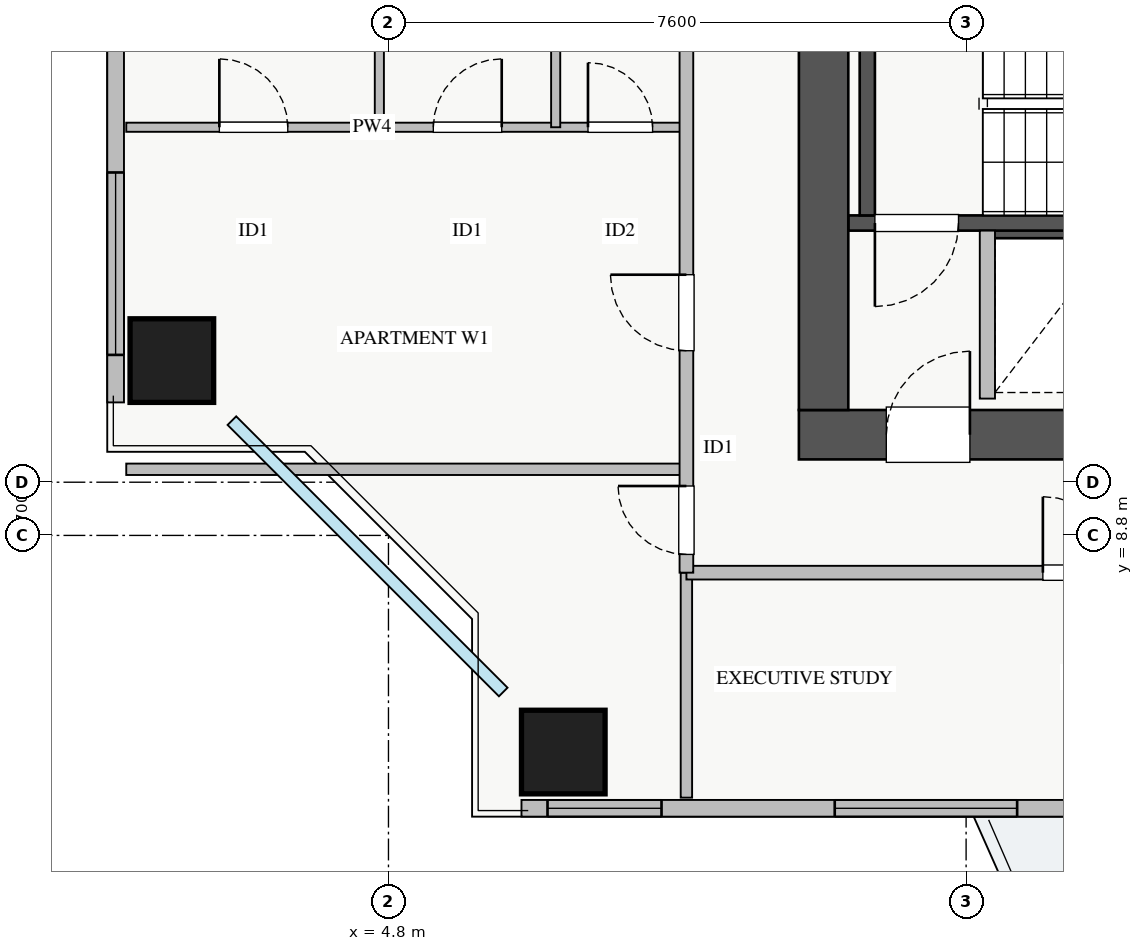
"""IFC4 building model, lengths in metres.
Left out: names, types, materials, properties, quantities, classifications, styles, units other than length and angle.
Written with IfcOpenShell. Run it as: python <this file> out.ifc"""

import sys

from ifc_helpers import new_model, si_unit, direction, frame, frame_2d, origin, origin_2d, place, context, subcontext, project, spatial, rectangle, extrude, source, transform, mapped, element, fill, save


model = new_model("IFC4")
c1 = context("Model", 3, precision=1e-05, world=origin(), true_north=direction((0.0, 1.0)))
c2 = subcontext(c1, "Body", "Model", "MODEL_VIEW")
j1 = project(units=[si_unit("LENGTHUNIT", "METRE"), si_unit("PLANEANGLEUNIT", "RADIAN")], contexts=[c1])
p1 = place(None, origin())
s1 = spatial("IfcSite", under=j1, at=p1, CompositionType="ELEMENT")
p2 = place(p1, origin())
s2 = spatial("IfcBuilding", under=s1, at=p2, CompositionType="ELEMENT")
p3 = place(p2, frame((0.0, 0.0, 126.25)))
s3 = spatial("IfcBuildingStorey", under=s2, at=p3, CompositionType="ELEMENT", Elevation=126.25)
p4 = place(p3, frame((12.68, 12.8, 0.0), z_axis=(0.0, 0.0, 1.0), x_axis=(1.0, 0.0, 0.0)))
e1 = element("IfcWall", 1, at=p4, inside=s3, PredefinedType="SHEAR", context=c2, shape_type="SweptSolid", body=[
    extrude(rectangle(XDim=1.94, YDim=0.18, at=frame_2d((0.97, 0.0))), origin(), (0.0, 0.0, 1.0), 3.07),
])
p5 = place(p3, frame((10.85, 12.91, 0.0), z_axis=(0.0, 0.0, 1.0), x_axis=(1.0, 0.0, 0.0)))
e2 = element("IfcWall", 2, at=p5, inside=s3, PredefinedType="SHEAR", context=c2, shape_type="SweptSolid", body=[
    extrude(rectangle(XDim=7.3, YDim=0.2, at=frame_2d((3.65, 0.0))), origin(), (0.0, 0.0, 1.0), 3.25),
])
p6 = place(p5, frame((0.35, 0.0, 0.0)))
e3 = element("IfcOpeningElement", 3, at=p6, cuts=e2, PredefinedType="OPENING", context=c2, shape_type="SweptSolid", body=[
    extrude(rectangle(XDim=1.1, YDim=2.05, at=frame_2d((0.55, 1.025))), frame((0.0, 0.11, 0.0), z_axis=(0.0, -1.0, 0.0), x_axis=(1.0, 0.0, 0.0)), (0.0, 0.0, 1.0), 0.22),
])
p7 = place(p3, frame((11.1, 13.01, 0.0), z_axis=(0.0, 0.0, 1.0), x_axis=(0.0, 1.0, 0.0)))
e4 = element("IfcWall", 4, at=p7, inside=s3, PredefinedType="SHEAR", context=c2, shape_type="SweptSolid", body=[
    extrude(rectangle(XDim=2.94, YDim=0.2, at=frame_2d((1.47, 0.0))), origin(), (0.0, 0.0, 1.0), 3.25),
])
p8 = place(p3, frame((10.2, 10.125, 0.0), z_axis=(0.0, 0.0, 1.0), x_axis=(1.0, 0.0, 0.0)))
e5 = element("IfcWall", 5, at=p8, inside=s3, PredefinedType="SHEAR", context=c2, shape_type="SweptSolid", body=[
    extrude(rectangle(XDim=17.6, YDim=0.65, at=frame_2d((8.8, 0.0))), origin(), (0.0, 0.0, 1.0), 3.25),
])
p9 = place(p8, frame((1.15, 0.0, 0.0)))
e6 = element("IfcOpeningElement", 6, at=p9, cuts=e5, PredefinedType="OPENING", context=c2, shape_type="SweptSolid", body=[
    extrude(rectangle(XDim=1.1, YDim=2.05, at=frame_2d((0.55, 1.025))), frame((0.0, 0.335, 0.0), z_axis=(0.0, -1.0, 0.0), x_axis=(1.0, 0.0, 0.0)), (0.0, 0.0, 1.0), 0.67),
])
p10 = place(p8, frame((8.3, 0.0, 0.0)))
e7 = element("IfcOpeningElement", 7, at=p10, cuts=e5, PredefinedType="OPENING", context=c2, shape_type="SweptSolid", body=[
    extrude(rectangle(XDim=1.1, YDim=2.05, at=frame_2d((0.55, 1.025))), frame((0.0, 0.335, 0.0), z_axis=(0.0, -1.0, 0.0), x_axis=(1.0, 0.0, 0.0)), (0.0, 0.0, 1.0), 0.67),
])
p11 = place(p8, frame((4.9, 0.0, 0.0)))
e8 = element("IfcOpeningElement", 8, at=p11, cuts=e5, PredefinedType="OPENING", context=c2, shape_type="SweptSolid", body=[
    extrude(rectangle(XDim=1.1, YDim=2.05, at=frame_2d((0.55, 1.025))), frame((0.0, 0.335, 0.0), z_axis=(0.0, -1.0, 0.0), x_axis=(1.0, 0.0, 0.0)), (0.0, 0.0, 1.0), 0.67),
])
p12 = place(p8, frame((14.74, 0.0, 0.0)))
e9 = element("IfcOpeningElement", 9, at=p12, cuts=e5, PredefinedType="OPENING", context=c2, shape_type="SweptSolid", body=[
    extrude(rectangle(XDim=1.0, YDim=2.05, at=frame_2d((0.5, 1.025))), frame((0.0, 0.335, 0.0), z_axis=(0.0, -1.0, 0.0), x_axis=(1.0, 0.0, 0.0)), (0.0, 0.0, 1.0), 0.67),
])
p13 = place(p8, frame((11.67, 0.0, 0.0)))
e10 = element("IfcOpeningElement", 10, at=p13, cuts=e5, PredefinedType="OPENING", context=c2, shape_type="SweptSolid", body=[
    extrude(rectangle(XDim=1.0, YDim=2.05, at=frame_2d((0.5, 1.025))), frame((0.0, 0.335, 0.0), z_axis=(0.0, -1.0, 0.0), x_axis=(1.0, 0.0, 0.0)), (0.0, 0.0, 1.0), 0.67),
])
p14 = place(p3, frame((10.525, 10.45, 0.0), z_axis=(0.0, 0.0, 1.0), x_axis=(0.0, 1.0, 0.0)))
e11 = element("IfcWall", 11, at=p14, inside=s3, PredefinedType="SHEAR", context=c2, shape_type="SweptSolid", body=[
    extrude(rectangle(XDim=5.9, YDim=0.65, at=frame_2d((2.95, 0.0))), origin(), (0.0, 0.0, 1.0), 3.25),
])
m1 = source(origin(), c2, "Body", "SweptSolid", [
    extrude(rectangle(XDim=1.1, YDim=1.1, at=origin_2d()), origin(), (0.0, 0.0, 1.0), 3.25),
])
for number, where, z_axis, x_axis in (
    (12, (7.1, 5.95, 0.0), (0.0, 0.0, 1.0), (1.0, 0.0, 0.0)),
    (13, (1.95, 11.1, 0.0), (0.0, 0.0, 1.0), (1.0, 0.0, 0.0)),
):
    element("IfcColumn", number, at=place(p3, frame(where, z_axis=z_axis, x_axis=x_axis)), inside=s3, PredefinedType="COLUMN", context=c2, shape_type="MappedRepresentation", body=[
        mapped(m1, transform((0.0, 0.0, 0.0), x_axis=(1.0, 0.0, 0.0), y_axis=(0.0, 1.0, 0.0), z_axis=(0.0, 0.0, 1.0), scale=1.0)),
    ])
p15 = place(p3, frame((6.55, 5.21, 0.0), z_axis=(0.0, 0.0, 1.0), x_axis=(1.0, 0.0, 0.0)))
e14 = element("IfcWall", 14, at=p15, inside=s3, PredefinedType="STANDARD", context=c2, shape_type="SweptSolid", body=[
    extrude(rectangle(XDim=24.9, YDim=0.22, at=frame_2d((12.45, 0.0))), origin(), (0.0, 0.0, 1.0), 2.61),
])
p16 = place(p15, frame((13.3, 0.0, 0.0)))
e15 = element("IfcOpeningElement", 15, at=p16, cuts=e14, PredefinedType="OPENING", context=c2, shape_type="SweptSolid", body=[
    extrude(rectangle(XDim=1.2, YDim=2.1, at=frame_2d((0.6, 1.05))), frame((0.0, 0.12, 0.0), z_axis=(0.0, -1.0, 0.0), x_axis=(1.0, 0.0, 0.0)), (0.0, 0.0, 1.0), 0.24),
])
p17 = place(p15, frame((0.343, 0.0, 0.9)))
e16 = element("IfcOpeningElement", 16, at=p17, cuts=e14, PredefinedType="OPENING", context=c2, shape_type="SweptSolid", body=[
    extrude(rectangle(XDim=1.5, YDim=1.5, at=frame_2d((0.75, 0.75))), frame((0.0, 0.12, 0.0), z_axis=(0.0, -1.0, 0.0), x_axis=(1.0, 0.0, 0.0)), (0.0, 0.0, 1.0), 0.24),
])
p18 = place(p15, frame((8.438, 0.0, 0.9)))
e17 = element("IfcOpeningElement", 17, at=p18, cuts=e14, PredefinedType="OPENING", context=c2, shape_type="SweptSolid", body=[
    extrude(rectangle(XDim=1.8, YDim=1.45, at=frame_2d((0.9, 0.725))), frame((0.0, 0.12, 0.0), z_axis=(0.0, -1.0, 0.0), x_axis=(1.0, 0.0, 0.0)), (0.0, 0.0, 1.0), 0.24),
])
p19 = place(p15, frame((14.813, 0.0, 0.9)))
e18 = element("IfcOpeningElement", 18, at=p19, cuts=e14, PredefinedType="OPENING", context=c2, shape_type="SweptSolid", body=[
    extrude(rectangle(XDim=1.5, YDim=1.45, at=frame_2d((0.75, 0.725))), frame((0.0, 0.12, 0.0), z_axis=(0.0, -1.0, 0.0), x_axis=(1.0, 0.0, 0.0)), (0.0, 0.0, 1.0), 0.24),
])
p20 = place(p15, frame((20.738, 0.0, 0.9)))
e19 = element("IfcOpeningElement", 19, at=p20, cuts=e14, PredefinedType="OPENING", context=c2, shape_type="SweptSolid", body=[
    extrude(rectangle(XDim=2.1, YDim=1.48, at=frame_2d((1.05, 0.74))), frame((0.0, 0.12, 0.0), z_axis=(0.0, -1.0, 0.0), x_axis=(1.0, 0.0, 0.0)), (0.0, 0.0, 1.0), 0.24),
])
p21 = place(p15, frame((4.122, 0.0, 0.9)))
e20 = element("IfcOpeningElement", 20, at=p21, cuts=e14, PredefinedType="OPENING", context=c2, shape_type="SweptSolid", body=[
    extrude(rectangle(XDim=2.4, YDim=1.5, at=frame_2d((1.2, 0.75))), frame((0.0, 0.12, 0.0), z_axis=(0.0, -1.0, 0.0), x_axis=(1.0, 0.0, 0.0)), (0.0, 0.0, 1.0), 0.24),
])
p22 = place(p3, frame((1.21, 10.55, 0.0), z_axis=(0.0, 0.0, 1.0), x_axis=(0.0, 1.0, 0.0)))
e21 = element("IfcWall", 21, at=p22, inside=s3, PredefinedType="STANDARD", context=c2, shape_type="SweptSolid", body=[
    extrude(rectangle(XDim=24.9, YDim=0.22, at=frame_2d((12.45, 0.0))), origin(), (0.0, 0.0, 1.0), 2.61),
])
p23 = place(p22, frame((13.3, 0.0, 0.0)))
e22 = element("IfcOpeningElement", 22, at=p23, cuts=e21, PredefinedType="OPENING", context=c2, shape_type="SweptSolid", body=[
    extrude(rectangle(XDim=1.2, YDim=2.1, at=frame_2d((0.6, 1.05))), frame((0.0, 0.12, 0.0), z_axis=(0.0, -1.0, 0.0), x_axis=(1.0, 0.0, 0.0)), (0.0, 0.0, 1.0), 0.24),
])
p24 = place(p22, frame((0.625, 0.0, 0.9)))
e23 = element("IfcOpeningElement", 23, at=p24, cuts=e21, PredefinedType="OPENING", context=c2, shape_type="SweptSolid", body=[
    extrude(rectangle(XDim=2.4, YDim=1.5, at=frame_2d((1.2, 0.75))), frame((0.0, 0.12, 0.0), z_axis=(0.0, -1.0, 0.0), x_axis=(1.0, 0.0, 0.0)), (0.0, 0.0, 1.0), 0.24),
])
p25 = place(p22, frame((21.82, 0.0, 0.9)))
e24 = element("IfcOpeningElement", 24, at=p25, cuts=e21, PredefinedType="OPENING", context=c2, shape_type="SweptSolid", body=[
    extrude(rectangle(XDim=2.1, YDim=1.5, at=frame_2d((1.05, 0.75))), frame((0.0, 0.12, 0.0), z_axis=(0.0, -1.0, 0.0), x_axis=(1.0, 0.0, 0.0)), (0.0, 0.0, 1.0), 0.24),
])
p26 = place(p22, frame((4.847, 0.0, 0.9)))
e25 = element("IfcOpeningElement", 25, at=p26, cuts=e21, PredefinedType="OPENING", context=c2, shape_type="SweptSolid", body=[
    extrude(rectangle(XDim=2.4, YDim=1.5, at=frame_2d((1.2, 0.75))), frame((0.0, 0.12, 0.0), z_axis=(0.0, -1.0, 0.0), x_axis=(1.0, 0.0, 0.0)), (0.0, 0.0, 1.0), 0.24),
])
p27 = place(p22, frame((16.895, 0.0, 0.9)))
e26 = element("IfcOpeningElement", 26, at=p27, cuts=e21, PredefinedType="OPENING", context=c2, shape_type="SweptSolid", body=[
    extrude(rectangle(XDim=0.9, YDim=1.2, at=frame_2d((0.45, 0.6))), frame((0.0, 0.12, 0.0), z_axis=(0.0, -1.0, 0.0), x_axis=(1.0, 0.0, 0.0)), (0.0, 0.0, 1.0), 0.24),
])
p28 = place(p3, frame((12.68, 10.6, 0.0), z_axis=(0.0, 0.0, 1.0), x_axis=(0.0, 1.0, 0.0)))
e27 = element("IfcWall", 27, at=p28, inside=s3, PredefinedType="PARTITIONING", context=c2, shape_type="SweptSolid", body=[
    extrude(rectangle(XDim=2.21, YDim=0.2, at=frame_2d((1.105, 0.0))), origin(), (0.0, 0.0, 1.0), 3.07),
])
p29 = place(p3, frame((8.72, 5.35, 0.0), z_axis=(0.0, 0.0, 1.0), x_axis=(0.0, 1.0, 0.0)))
e28 = element("IfcWall", 28, at=p29, inside=s3, PredefinedType="PARTITIONING", context=c2, shape_type="SweptSolid", body=[
    extrude(rectangle(XDim=2.96, YDim=0.15, at=frame_2d((1.48, 0.0))), origin(), (0.0, 0.0, 1.0), 3.07),
])
p30 = place(p3, frame((8.72, 8.31, 0.0), z_axis=(0.0, 0.0, 1.0), x_axis=(1.0, 0.0, 0.0)))
e29 = element("IfcWall", 29, at=p30, inside=s3, PredefinedType="PARTITIONING", context=c2, shape_type="SweptSolid", body=[
    extrude(rectangle(XDim=23.63, YDim=0.18, at=frame_2d((11.815, 0.0))), origin(), (0.0, 0.0, 1.0), 3.07),
])
p31 = place(p30, frame((4.69, 0.0, 0.0)))
e30 = element("IfcOpeningElement", 30, at=p31, cuts=e29, PredefinedType="OPENING", context=c2, shape_type="SweptSolid", body=[
    extrude(rectangle(XDim=1.0, YDim=2.05, at=frame_2d((0.5, 1.025))), frame((0.0, 0.1, 0.0), z_axis=(0.0, -1.0, 0.0), x_axis=(1.0, 0.0, 0.0)), (0.0, 0.0, 1.0), 0.2),
])
p32 = place(p30, frame((16.32, 0.0, 0.0)))
e31 = element("IfcOpeningElement", 31, at=p32, cuts=e29, PredefinedType="OPENING", context=c2, shape_type="SweptSolid", body=[
    extrude(rectangle(XDim=1.0, YDim=2.05, at=frame_2d((0.5, 1.025))), frame((0.0, 0.1, 0.0), z_axis=(0.0, -1.0, 0.0), x_axis=(1.0, 0.0, 0.0)), (0.0, 0.0, 1.0), 0.2),
])
p33 = place(p3, frame((1.35, 9.67, 0.0), z_axis=(0.0, 0.0, 1.0), x_axis=(1.0, 0.0, 0.0)))
e32 = element("IfcWall", 32, at=p33, inside=s3, PredefinedType="PARTITIONING", context=c2, shape_type="SweptSolid", body=[
    extrude(rectangle(XDim=7.37, YDim=0.15, at=frame_2d((3.685, 0.0))), origin(), (0.0, 0.0, 1.0), 3.07),
])
p34 = place(p3, frame((1.35, 14.17, 0.0), z_axis=(0.0, 0.0, 1.0), x_axis=(1.0, 0.0, 0.0)))
e33 = element("IfcWall", 33, at=p34, inside=s3, PredefinedType="PLUMBINGWALL", context=c2, shape_type="SweptSolid", body=[
    extrude(rectangle(XDim=7.37, YDim=0.12, at=frame_2d((3.685, 0.0))), origin(), (0.0, 0.0, 1.0), 3.07),
])
p35 = place(p34, frame((1.225, 0.0, 0.0)))
e34 = element("IfcOpeningElement", 34, at=p35, cuts=e33, PredefinedType="OPENING", context=c2, shape_type="SweptSolid", body=[
    extrude(rectangle(XDim=0.9, YDim=2.05, at=frame_2d((0.45, 1.025))), frame((0.0, 0.07, 0.0), z_axis=(0.0, -1.0, 0.0), x_axis=(1.0, 0.0, 0.0)), (0.0, 0.0, 1.0), 0.14),
])
p36 = place(p34, frame((4.04, 0.0, 0.0)))
e35 = element("IfcOpeningElement", 35, at=p36, cuts=e33, PredefinedType="OPENING", context=c2, shape_type="SweptSolid", body=[
    extrude(rectangle(XDim=0.9, YDim=2.05, at=frame_2d((0.45, 1.025))), frame((0.0, 0.07, 0.0), z_axis=(0.0, -1.0, 0.0), x_axis=(1.0, 0.0, 0.0)), (0.0, 0.0, 1.0), 0.14),
])
p37 = place(p34, frame((6.075, 0.0, 0.0)))
e36 = element("IfcOpeningElement", 36, at=p37, cuts=e33, PredefinedType="OPENING", context=c2, shape_type="SweptSolid", body=[
    extrude(rectangle(XDim=0.85, YDim=2.05, at=frame_2d((0.425, 1.025))), frame((0.0, 0.07, 0.0), z_axis=(0.0, -1.0, 0.0), x_axis=(1.0, 0.0, 0.0)), (0.0, 0.0, 1.0), 0.14),
])
for number, where, z_axis, x_axis in (
    (37, (4.68, 14.17, 0.0), (0.0, 0.0, 1.0), (0.0, 1.0, 0.0)),
    (38, (7.0, 14.17, 0.0), (0.0, 0.0, 1.0), (0.0, 1.0, 0.0)),
):
    element("IfcWall", number, at=place(p3, frame(where, z_axis=z_axis, x_axis=x_axis)), inside=s3, PredefinedType="PLUMBINGWALL", context=c2, shape_type="SweptSolid", body=[
        extrude(rectangle(XDim=4.87, YDim=0.12, at=frame_2d((2.435, 0.0))), origin(), (0.0, 0.0, 1.0), 3.07),
    ])
p38 = place(p3, frame((8.72, 8.31, 0.0), z_axis=(0.0, 0.0, 1.0), x_axis=(0.0, 1.0, 0.0)))
e39 = element("IfcWall", 39, at=p38, inside=s3, PredefinedType="PARTITIONING", context=c2, shape_type="SweptSolid", body=[
    extrude(rectangle(XDim=29.37, YDim=0.18, at=frame_2d((14.685, 0.0))), origin(), (0.0, 0.0, 1.0), 3.07),
])
p39 = place(p38, frame((28.06, 0.0, 0.0)))
e40 = element("IfcOpeningElement", 40, at=p39, cuts=e39, PredefinedType="OPENING", context=c2, shape_type="SweptSolid", body=[
    extrude(rectangle(XDim=0.9, YDim=2.05, at=frame_2d((0.45, 1.025))), frame((0.0, 0.1, 0.0), z_axis=(0.0, -1.0, 0.0), x_axis=(1.0, 0.0, 0.0)), (0.0, 0.0, 1.0), 0.2),
])
p40 = place(p38, frame((0.24, 0.0, 0.0)))
e41 = element("IfcOpeningElement", 41, at=p40, cuts=e39, PredefinedType="OPENING", context=c2, shape_type="SweptSolid", body=[
    extrude(rectangle(XDim=0.9, YDim=2.05, at=frame_2d((0.45, 1.025))), frame((0.0, 0.1, 0.0), z_axis=(0.0, -1.0, 0.0), x_axis=(1.0, 0.0, 0.0)), (0.0, 0.0, 1.0), 0.2),
])
p41 = place(p38, frame((2.92, 0.0, 0.0)))
e42 = element("IfcOpeningElement", 42, at=p41, cuts=e39, PredefinedType="OPENING", context=c2, shape_type="SweptSolid", body=[
    extrude(rectangle(XDim=1.0, YDim=2.05, at=frame_2d((0.5, 1.025))), frame((0.0, 0.1, 0.0), z_axis=(0.0, -1.0, 0.0), x_axis=(1.0, 0.0, 0.0)), (0.0, 0.0, 1.0), 0.2),
])
p42 = place(p38, frame((14.315, 0.0, 0.0)))
e43 = element("IfcOpeningElement", 43, at=p42, cuts=e39, PredefinedType="OPENING", context=c2, shape_type="SweptSolid", body=[
    extrude(rectangle(XDim=1.0, YDim=2.05, at=frame_2d((0.5, 1.025))), frame((0.0, 0.1, 0.0), z_axis=(0.0, -1.0, 0.0), x_axis=(1.0, 0.0, 0.0)), (0.0, 0.0, 1.0), 0.2),
])
p43 = place(p38, frame((20.315, 0.0, 0.0)))
e44 = element("IfcOpeningElement", 44, at=p43, cuts=e39, PredefinedType="OPENING", context=c2, shape_type="SweptSolid", body=[
    extrude(rectangle(XDim=1.0, YDim=2.05, at=frame_2d((0.5, 1.025))), frame((0.0, 0.1, 0.0), z_axis=(0.0, -1.0, 0.0), x_axis=(1.0, 0.0, 0.0)), (0.0, 0.0, 1.0), 0.2),
])
m2 = source(origin(), c2, "Body", "SweptSolid", [
    extrude(rectangle(XDim=1.5, YDim=1.5, at=frame_2d((0.75, 0.75))), frame((0.0, 0.03, 0.0), z_axis=(0.0, -1.0, 0.0), x_axis=(1.0, 0.0, 0.0)), (0.0, 0.0, 1.0), 0.06),
])
p44 = place(p17, origin())
e45 = element("IfcWindow", 45, at=p44, inside=s3, PartitioningType="TRIPLE_PANEL_VERTICAL", PredefinedType="WINDOW", context=c2, shape_type="MappedRepresentation", body=[
    mapped(m2, transform((0.0, 0.0, 0.0), x_axis=(1.0, 0.0, 0.0), y_axis=(0.0, 1.0, 0.0), z_axis=(0.0, 0.0, 1.0), scale=1.0)),
])
fill(e16, e45)
m3 = source(origin(), c2, "Body", "SweptSolid", [
    extrude(rectangle(XDim=2.4, YDim=1.5, at=frame_2d((1.2, 0.75))), frame((0.0, 0.03, 0.0), z_axis=(0.0, -1.0, 0.0), x_axis=(1.0, 0.0, 0.0)), (0.0, 0.0, 1.0), 0.06),
])
p45 = place(p24, origin())
e46 = element("IfcWindow", 46, at=p45, inside=s3, PartitioningType="TRIPLE_PANEL_VERTICAL", PredefinedType="WINDOW", context=c2, shape_type="MappedRepresentation", body=[
    mapped(m3, transform((0.0, 0.0, 0.0), x_axis=(1.0, 0.0, 0.0), y_axis=(0.0, 1.0, 0.0), z_axis=(0.0, 0.0, 1.0), scale=1.0)),
])
fill(e23, e46)
m4 = source(origin(), c2, "Body", "SweptSolid", [
    extrude(rectangle(XDim=1.1, YDim=2.05, at=frame_2d((0.55, 1.025))), frame((0.0, 0.025, 0.0), z_axis=(0.0, -1.0, 0.0), x_axis=(1.0, 0.0, 0.0)), (0.0, 0.0, 1.0), 0.05),
])
p46 = place(p9, origin())
e47 = element("IfcDoor", 47, at=p46, inside=s3, OperationType="SINGLE_SWING_RIGHT", PredefinedType="DOOR", context=c2, shape_type="MappedRepresentation", body=[
    mapped(m4, transform((0.0, 0.0, 0.0), x_axis=(1.0, 0.0, 0.0), y_axis=(0.0, 1.0, 0.0), z_axis=(0.0, 0.0, 1.0), scale=1.0)),
])
fill(e6, e47)
p47 = place(p6, frame((1.1, 0.0, 0.0), z_axis=(0.0, 0.0, 1.0), x_axis=(-1.0, 0.0, 0.0)))
e48 = element("IfcDoor", 48, at=p47, inside=s3, OperationType="SINGLE_SWING_LEFT", PredefinedType="DOOR", context=c2, shape_type="MappedRepresentation", body=[
    mapped(m4, transform((0.0, 0.0, 0.0), x_axis=(1.0, 0.0, 0.0), y_axis=(0.0, 1.0, 0.0), z_axis=(0.0, 0.0, 1.0), scale=1.0)),
])
fill(e3, e48)
m5 = source(origin(), c2, "Body", "SweptSolid", [
    extrude(rectangle(XDim=1.0, YDim=2.05, at=frame_2d((0.5, 1.025))), frame((0.0, 0.025, 0.0), z_axis=(0.0, -1.0, 0.0), x_axis=(1.0, 0.0, 0.0)), (0.0, 0.0, 1.0), 0.05),
])
p48 = place(p31, origin())
e49 = element("IfcDoor", 49, at=p48, inside=s3, OperationType="SINGLE_SWING_LEFT", PredefinedType="DOOR", context=c2, shape_type="MappedRepresentation", body=[
    mapped(m5, transform((0.0, 0.0, 0.0), x_axis=(1.0, 0.0, 0.0), y_axis=(0.0, 1.0, 0.0), z_axis=(0.0, 0.0, 1.0), scale=1.0)),
])
fill(e30, e49)
m6 = source(origin(), c2, "Body", "SweptSolid", [
    extrude(rectangle(XDim=0.9, YDim=2.05, at=frame_2d((0.45, 1.025))), frame((0.0, 0.025, 0.0), z_axis=(0.0, -1.0, 0.0), x_axis=(1.0, 0.0, 0.0)), (0.0, 0.0, 1.0), 0.05),
])
p49 = place(p35, origin())
e50 = element("IfcDoor", 50, at=p49, inside=s3, OperationType="SINGLE_SWING_LEFT", PredefinedType="DOOR", context=c2, shape_type="MappedRepresentation", body=[
    mapped(m6, transform((0.0, 0.0, 0.0), x_axis=(1.0, 0.0, 0.0), y_axis=(0.0, 1.0, 0.0), z_axis=(0.0, 0.0, 1.0), scale=1.0)),
])
fill(e34, e50)
p50 = place(p36, origin())
e51 = element("IfcDoor", 51, at=p50, inside=s3, OperationType="SINGLE_SWING_RIGHT", PredefinedType="DOOR", context=c2, shape_type="MappedRepresentation", body=[
    mapped(m6, transform((0.0, 0.0, 0.0), x_axis=(1.0, 0.0, 0.0), y_axis=(0.0, 1.0, 0.0), z_axis=(0.0, 0.0, 1.0), scale=1.0)),
])
fill(e35, e51)
m7 = source(origin(), c2, "Body", "SweptSolid", [
    extrude(rectangle(XDim=0.85, YDim=2.05, at=frame_2d((0.425, 1.025))), frame((0.0, 0.025, 0.0), z_axis=(0.0, -1.0, 0.0), x_axis=(1.0, 0.0, 0.0)), (0.0, 0.0, 1.0), 0.05),
])
p51 = place(p37, origin())
e52 = element("IfcDoor", 52, at=p51, inside=s3, OperationType="SINGLE_SWING_LEFT", PredefinedType="DOOR", context=c2, shape_type="MappedRepresentation", body=[
    mapped(m7, transform((0.0, 0.0, 0.0), x_axis=(1.0, 0.0, 0.0), y_axis=(0.0, 1.0, 0.0), z_axis=(0.0, 0.0, 1.0), scale=1.0)),
])
fill(e36, e52)
p52 = place(p40, origin())
e53 = element("IfcDoor", 53, at=p52, inside=s3, OperationType="SINGLE_SWING_RIGHT", PredefinedType="DOOR", context=c2, shape_type="MappedRepresentation", body=[
    mapped(m6, transform((0.0, 0.0, 0.0), x_axis=(1.0, 0.0, 0.0), y_axis=(0.0, 1.0, 0.0), z_axis=(0.0, 0.0, 1.0), scale=1.0)),
])
fill(e41, e53)
p53 = place(p41, origin())
e54 = element("IfcDoor", 54, at=p53, inside=s3, OperationType="SINGLE_SWING_RIGHT", PredefinedType="DOOR", context=c2, shape_type="MappedRepresentation", body=[
    mapped(m5, transform((0.0, 0.0, 0.0), x_axis=(1.0, 0.0, 0.0), y_axis=(0.0, 1.0, 0.0), z_axis=(0.0, 0.0, 1.0), scale=1.0)),
])
fill(e42, e54)
p54 = place(p21, origin())
e55 = element("IfcWindow", 55, at=p54, inside=s3, PartitioningType="TRIPLE_PANEL_VERTICAL", PredefinedType="WINDOW", context=c2, shape_type="MappedRepresentation", body=[
    mapped(m3, transform((0.0, 0.0, 0.0), x_axis=(1.0, 0.0, 0.0), y_axis=(0.0, 1.0, 0.0), z_axis=(0.0, 0.0, 1.0), scale=1.0)),
])
fill(e20, e55)
save(model, sys.argv[1])
